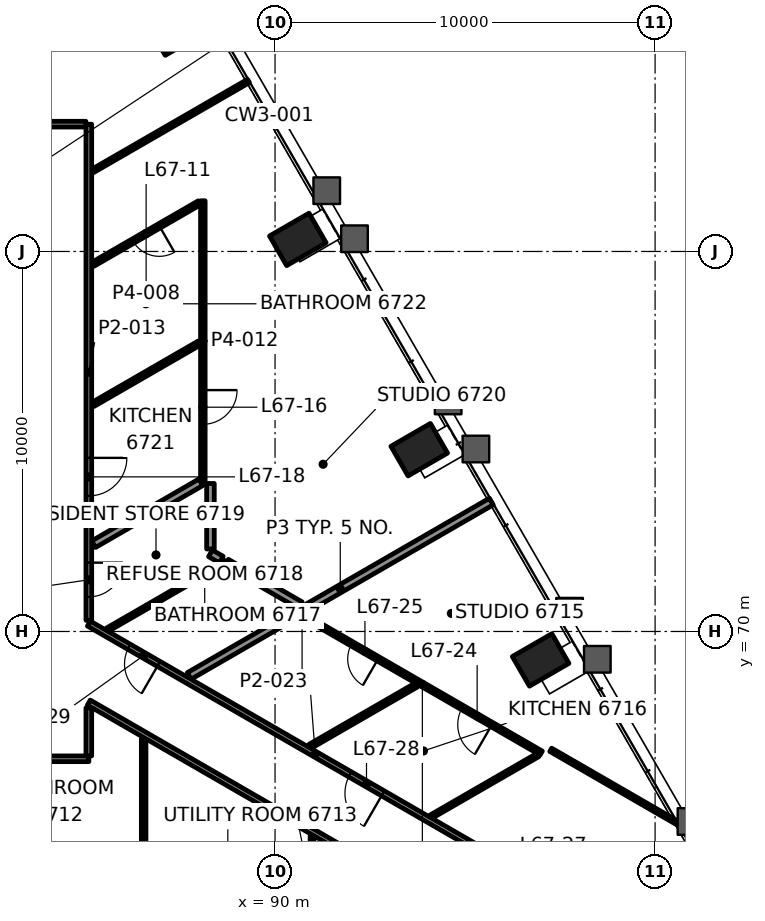
"""IFC4 building model, lengths in metres.
Left out: names, types, materials, properties, quantities, classifications, styles, units other than length and angle.
Written with IfcOpenShell. Run it as: python <this file> out.ifc"""

import sys

from ifc_helpers import new_model, si_unit, direction, frame, frame_2d, origin, origin_2d, place, context, subcontext, project, spatial, rectangle, hollow_rectangle, extrude, element, fill, save


model = new_model("IFC4")
c1 = context("Model", 3, precision=1e-05, world=origin(), true_north=direction((0.0, 1.0)))
c2 = subcontext(c1, "Body", "Model", "MODEL_VIEW")
j1 = project(units=[si_unit("LENGTHUNIT", "METRE"), si_unit("PLANEANGLEUNIT", "RADIAN")], contexts=[c1])
p1 = place(None, origin())
s1 = spatial("IfcSite", under=j1, at=p1, CompositionType="ELEMENT")
p2 = place(p1, origin())
s2 = spatial("IfcBuilding", under=s1, at=p2, CompositionType="ELEMENT")
p3 = place(p2, frame((0.0, 0.0, 281.1)))
s3 = spatial("IfcBuildingStorey", under=s2, at=p3, CompositionType="ELEMENT", Elevation=281.1)
for number, where, z_axis, x_axis in (
    (1, (96.989, 69.251, -0.0), (0.0, 0.0, 1.0), (-0.5, 0.866, 0.0)),
    (2, (93.794, 74.784, -0.0), (0.0, 0.0, 1.0), (-0.5, 0.866, 0.0)),
    (3, (90.599, 80.317, -0.0), (0.0, 0.0, 1.0), (-0.5, 0.866, 0.0)),
    (4, (87.405, 85.851, -0.0), (0.0, 0.0, 1.0), (-0.5, 0.866, 0.0)),
):
    element("IfcColumn", number, at=place(p3, frame(where, z_axis=z_axis, x_axis=x_axis)), inside=s3, PredefinedType="COLUMN", context=c2, shape_type="SweptSolid", body=[
        extrude(hollow_rectangle(XDim=0.9, YDim=1.2, WallThickness=0.06, at=origin_2d()), origin(), (0.0, 0.0, 1.0), 3.5),
    ])
p4 = place(p3, frame((85.1, 66.65, 0.0), z_axis=(0.0, 0.0, 1.0), x_axis=(-1.0, 0.0, 0.0)))
e5 = element("IfcWall", 5, at=p4, inside=s3, PredefinedType="PARTITIONING", context=c2, shape_type="SweptSolid", body=[
    extrude(rectangle(XDim=20.2, YDim=0.15, at=frame_2d((10.1, 0.0))), origin(), (0.0, 0.0, 1.0), 2.7),
])
p5 = place(p4, frame((6.405, 0.0, 0.0)))
e6 = element("IfcOpeningElement", 6, at=p5, cuts=e5, PredefinedType="OPENING", context=c2, shape_type="SweptSolid", body=[
    extrude(rectangle(XDim=1.0, YDim=2.1, at=frame_2d((0.5, 1.05))), frame((0.0, 0.085, 0.0), z_axis=(0.0, -1.0, 0.0), x_axis=(1.0, 0.0, 0.0)), (0.0, 0.0, 1.0), 0.17),
])
p6 = place(p4, frame((12.845, 0.0, 0.0)))
e7 = element("IfcOpeningElement", 7, at=p6, cuts=e5, PredefinedType="OPENING", context=c2, shape_type="SweptSolid", body=[
    extrude(rectangle(XDim=0.9, YDim=2.1, at=frame_2d((0.45, 1.05))), frame((0.0, 0.085, 0.0), z_axis=(0.0, -1.0, 0.0), x_axis=(1.0, 0.0, 0.0)), (0.0, 0.0, 1.0), 0.17),
])
p7 = place(p3, frame((78.2, 83.35, 0.0), z_axis=(0.0, 0.0, 1.0), x_axis=(1.0, 0.0, 0.0)))
e8 = element("IfcWall", 8, at=p7, inside=s3, PredefinedType="PARTITIONING", context=c2, shape_type="SweptSolid", body=[
    extrude(rectangle(XDim=6.823, YDim=0.15, at=frame_2d((3.412, 0.0))), origin(), (0.0, 0.0, 1.0), 2.7),
])
p8 = place(p7, frame((2.961, 0.0, 0.0)))
e9 = element("IfcOpeningElement", 9, at=p8, cuts=e8, PredefinedType="OPENING", context=c2, shape_type="SweptSolid", body=[
    extrude(rectangle(XDim=0.9, YDim=2.1, at=frame_2d((0.45, 1.05))), frame((0.0, 0.085, 0.0), z_axis=(0.0, -1.0, 0.0), x_axis=(1.0, 0.0, 0.0)), (0.0, 0.0, 1.0), 0.17),
])
p9 = place(p3, frame((94.104, 65.126, 0.0), z_axis=(0.0, 0.0, 1.0), x_axis=(0.866000336211, 0.500043415797, 0.0)))
e10 = element("IfcWall", 10, at=p9, inside=s3, PredefinedType="PARTITIONING", context=c2, shape_type="SweptSolid", body=[
    extrude(rectangle(XDim=3.248, YDim=0.1, at=frame_2d((1.624, 0.0))), origin(), (0.0, 0.0, 1.0), 2.7),
])
p10 = place(p3, frame((90.918, 66.975, 0.0), z_axis=(0.0, 0.0, 1.0), x_axis=(0.86605210011, 0.499953757757, 0.0)))
e11 = element("IfcWall", 11, at=p10, inside=s3, PredefinedType="PARTITIONING", context=c2, shape_type="SweptSolid", body=[
    extrude(rectangle(XDim=3.228, YDim=0.12, at=frame_2d((1.614, 0.0))), origin(), (0.0, 0.0, 1.0), 2.7),
])
p11 = place(p3, frame((87.741, 68.83, 0.0), z_axis=(0.0, 0.0, 1.0), x_axis=(0.866026579827, 0.499997963029, 0.0)))
e12 = element("IfcWall", 12, at=p11, inside=s3, PredefinedType="PARTITIONING", context=c2, shape_type="SweptSolid", body=[
    extrude(rectangle(XDim=9.179, YDim=0.2, at=frame_2d((4.59, 0.0))), origin(), (0.0, 0.0, 1.0), 2.688),
])
p12 = place(p3, frame((85.585, 70.045, 0.0), z_axis=(0.0, 0.0, 1.0), x_axis=(0.866004928679, 0.500035462246, 0.0)))
e13 = element("IfcWall", 13, at=p12, inside=s3, PredefinedType="PARTITIONING", context=c2, shape_type="SweptSolid", body=[
    extrude(rectangle(XDim=3.578, YDim=0.1, at=frame_2d((1.789, 0.0))), origin(), (0.0, 0.0, 1.0), 2.7),
])
p13 = place(p3, frame((85.227, 72.297, 0.0), z_axis=(0.0, 0.0, 1.0), x_axis=(0.866002113569, 0.500040337666, 0.0)))
e14 = element("IfcWall", 14, at=p13, inside=s3, PredefinedType="PARTITIONING", context=c2, shape_type="SweptSolid", body=[
    extrude(rectangle(XDim=3.258, YDim=0.2, at=frame_2d((1.629, 0.0))), origin(), (0.0, 0.0, 1.0), 2.7),
])
p14 = place(p3, frame((85.21, 75.976, 0.0), z_axis=(0.0, 0.0, 1.0), x_axis=(0.86605210011, 0.499953757757, 0.0)))
e15 = element("IfcWall", 15, at=p14, inside=s3, PredefinedType="PARTITIONING", context=c2, shape_type="SweptSolid", body=[
    extrude(rectangle(XDim=3.228, YDim=0.12, at=frame_2d((1.614, 0.0))), origin(), (0.0, 0.0, 1.0), 2.7),
])
p15 = place(p3, frame((88.005, 81.279, 0.0), z_axis=(0.0, 0.0, 1.0), x_axis=(-0.866000447062, -0.500043223821, 0.0)))
e16 = element("IfcWall", 16, at=p15, inside=s3, PredefinedType="PARTITIONING", context=c2, shape_type="SweptSolid", body=[
    extrude(rectangle(XDim=3.228, YDim=0.12, at=frame_2d((1.614, 0.0))), origin(), (0.0, 0.0, 1.0), 2.7),
])
p16 = place(p15, frame((1.214, 0.0, 0.0)))
e17 = element("IfcOpeningElement", 17, at=p16, cuts=e16, PredefinedType="OPENING", context=c2, shape_type="SweptSolid", body=[
    extrude(rectangle(XDim=0.8, YDim=2.1, at=frame_2d((0.4, 1.05))), frame((0.0, 0.07, 0.0), z_axis=(0.0, -1.0, 0.0), x_axis=(1.0, 0.0, 0.0)), (0.0, 0.0, 1.0), 0.14),
])
p17 = place(p3, frame((85.201, 82.119, 0.0), z_axis=(0.0, 0.0, 1.0), x_axis=(0.866035297817, 0.499982862641, 0.0)))
e18 = element("IfcWall", 18, at=p17, inside=s3, PredefinedType="PARTITIONING", context=c2, shape_type="SweptSolid", body=[
    extrude(rectangle(XDim=4.734, YDim=0.1, at=frame_2d((2.367, 0.0))), origin(), (0.0, 0.0, 1.0), 2.688),
])
p18 = place(p3, frame((90.973, 59.432, 0.0), z_axis=(0.0, 0.0, 1.0), x_axis=(0.0, 1.0, 0.0)))
e19 = element("IfcWall", 19, at=p18, inside=s3, PredefinedType="PARTITIONING", context=c2, shape_type="SweptSolid", body=[
    extrude(rectangle(XDim=5.19, YDim=0.1, at=frame_2d((2.595, 0.0))), origin(), (0.0, 0.0, 1.0), 2.7),
])
p19 = place(p3, frame((88.3, 72.171, 0.0), z_axis=(0.0, 0.0, 1.0), x_axis=(0.0, 1.0, 0.0)))
e20 = element("IfcWall", 20, at=p19, inside=s3, PredefinedType="PARTITIONING", context=c2, shape_type="SweptSolid", body=[
    extrude(rectangle(XDim=1.724, YDim=0.2, at=frame_2d((0.862, 0.0))), origin(), (0.0, 0.0, 1.0), 2.7),
])
p20 = place(p3, frame((88.1, 81.334, 0.0), z_axis=(0.0, 0.0, 1.0), x_axis=(0.0, -1.0, 0.0)))
e21 = element("IfcWall", 21, at=p20, inside=s3, PredefinedType="PARTITIONING", context=c2, shape_type="SweptSolid", body=[
    extrude(rectangle(XDim=7.378, YDim=0.12, at=frame_2d((3.689, 0.0))), origin(), (0.0, 0.0, 1.0), 2.7),
])
p21 = place(p20, frame((4.982, 0.0, 0.0)))
e22 = element("IfcOpeningElement", 22, at=p21, cuts=e21, PredefinedType="OPENING", context=c2, shape_type="SweptSolid", body=[
    extrude(rectangle(XDim=0.9, YDim=2.1, at=frame_2d((0.45, 1.05))), frame((0.0, 0.07, 0.0), z_axis=(0.0, -1.0, 0.0), x_axis=(1.0, 0.0, 0.0)), (0.0, 0.0, 1.0), 0.14),
])
p22 = place(p3, frame((86.542, 63.71, 0.0), z_axis=(0.0, 0.0, 1.0), x_axis=(0.0, 1.0, 0.0)))
e23 = element("IfcWall", 23, at=p22, inside=s3, PredefinedType="PARTITIONING", context=c2, shape_type="SweptSolid", body=[
    extrude(rectangle(XDim=3.46, YDim=0.12, at=frame_2d((1.73, 0.0))), origin(), (0.0, 0.0, 1.0), 2.547),
])
p23 = place(p3, frame((85.1, 66.725, 0.0), z_axis=(0.0, 0.0, 1.0), x_axis=(0.0, 1.0, 0.0)))
e24 = element("IfcWall", 24, at=p23, inside=s3, PredefinedType="PARTITIONING", context=c2, shape_type="SweptSolid", body=[
    extrude(rectangle(XDim=1.268, YDim=0.15, at=frame_2d((0.634, 0.0))), origin(), (0.0, 0.0, 1.0), 2.547),
])
p24 = place(p3, frame((85.1, 83.348, 0.0), z_axis=(0.0, 0.0, 1.0), x_axis=(0.0, -1.0, 0.0)))
e25 = element("IfcWall", 25, at=p24, inside=s3, PredefinedType="PARTITIONING", context=c2, shape_type="SweptSolid", body=[
    extrude(rectangle(XDim=13.053, YDim=0.15, at=frame_2d((6.527, 0.0))), origin(), (0.0, 0.0, 1.0), 2.7),
])
p25 = place(p24, frame((8.78, 0.0, 0.0)))
e26 = element("IfcOpeningElement", 26, at=p25, cuts=e25, PredefinedType="OPENING", context=c2, shape_type="SweptSolid", body=[
    extrude(rectangle(XDim=1.0, YDim=2.1, at=frame_2d((0.5, 1.05))), frame((0.0, 0.085, 0.0), z_axis=(0.0, -1.0, 0.0), x_axis=(1.0, 0.0, 0.0)), (0.0, 0.0, 1.0), 0.17),
])
p26 = place(p24, frame((11.537, 0.0, 0.0)))
e27 = element("IfcOpeningElement", 27, at=p26, cuts=e25, PredefinedType="OPENING", context=c2, shape_type="SweptSolid", body=[
    extrude(rectangle(XDim=0.9, YDim=2.1, at=frame_2d((0.45, 1.05))), frame((0.0, 0.085, 0.0), z_axis=(0.0, -1.0, 0.0), x_axis=(1.0, 0.0, 0.0)), (0.0, 0.0, 1.0), 0.17),
])
p27 = place(p3, frame((100.566, 64.974, 0.0), z_axis=(0.0, 0.0, 1.0), x_axis=(-0.8660389038, 0.499976616558, 0.0)))
e28 = element("IfcWall", 28, at=p27, inside=s3, PredefinedType="PARTITIONING", context=c2, shape_type="SweptSolid", body=[
    extrude(rectangle(XDim=3.825, YDim=0.1, at=frame_2d((1.913, 0.0))), origin(), (0.0, 0.0, 1.0), 2.7),
])
p28 = place(p3, frame((90.662, 70.692, 0.0), z_axis=(0.0, 0.0, 1.0), x_axis=(-0.866034963436, 0.499983441833, 0.0)))
e29 = element("IfcWall", 29, at=p28, inside=s3, PredefinedType="PARTITIONING", context=c2, shape_type="SweptSolid", body=[
    extrude(rectangle(XDim=2.24, YDim=0.2, at=frame_2d((1.12, 0.0))), origin(), (0.0, 0.0, 1.0), 2.7),
])
p29 = place(p3, frame((97.003, 66.8, 0.0), z_axis=(0.0, 0.0, 1.0), x_axis=(-0.866012764826, 0.500021890679, 0.0)))
e30 = element("IfcWall", 30, at=p29, inside=s3, PredefinedType="PARTITIONING", context=c2, shape_type="SweptSolid", body=[
    extrude(rectangle(XDim=7.222, YDim=0.12, at=frame_2d((3.611, 0.0))), origin(), (0.0, 0.0, 1.0), 2.7),
])
p30 = place(p29, frame((1.496, 0.0, 0.0)))
e31 = element("IfcOpeningElement", 31, at=p30, cuts=e30, PredefinedType="OPENING", context=c2, shape_type="SweptSolid", body=[
    extrude(rectangle(XDim=0.9, YDim=2.1, at=frame_2d((0.45, 1.05))), frame((0.0, 0.07, 0.0), z_axis=(0.0, -1.0, 0.0), x_axis=(1.0, 0.0, 0.0)), (0.0, 0.0, 1.0), 0.14),
])
p31 = place(p29, frame((4.956, 0.0, 0.0)))
e32 = element("IfcOpeningElement", 32, at=p31, cuts=e30, PredefinedType="OPENING", context=c2, shape_type="SweptSolid", body=[
    extrude(rectangle(XDim=0.8, YDim=2.1, at=frame_2d((0.4, 1.05))), frame((0.0, 0.07, 0.0), z_axis=(0.0, -1.0, 0.0), x_axis=(1.0, 0.0, 0.0)), (0.0, 0.0, 1.0), 0.14),
])
p32 = place(p3, frame((97.014, 63.329, 0.0), z_axis=(0.0, 0.0, 1.0), x_axis=(-0.866023045711, 0.500004084281, 0.0)))
e33 = element("IfcWall", 33, at=p32, inside=s3, PredefinedType="PARTITIONING", context=c2, shape_type="SweptSolid", body=[
    extrude(rectangle(XDim=13.757, YDim=0.15, at=frame_2d((6.879, 0.0))), origin(), (0.0, 0.0, 1.0), 2.7),
])
p33 = place(p32, frame((1.39, 0.0, 0.0)))
e34 = element("IfcOpeningElement", 34, at=p33, cuts=e33, PredefinedType="OPENING", context=c2, shape_type="SweptSolid", body=[
    extrude(rectangle(XDim=0.9, YDim=2.1, at=frame_2d((0.45, 1.05))), frame((0.0, 0.085, 0.0), z_axis=(0.0, -1.0, 0.0), x_axis=(1.0, 0.0, 0.0)), (0.0, 0.0, 1.0), 0.17),
])
p34 = place(p32, frame((4.821, 0.0, 0.0)))
e35 = element("IfcOpeningElement", 35, at=p34, cuts=e33, PredefinedType="OPENING", context=c2, shape_type="SweptSolid", body=[
    extrude(rectangle(XDim=1.0, YDim=2.1, at=frame_2d((0.5, 1.05))), frame((0.0, 0.085, 0.0), z_axis=(0.0, -1.0, 0.0), x_axis=(1.0, 0.0, 0.0)), (0.0, 0.0, 1.0), 0.17),
])
p35 = place(p32, frame((11.634, 0.0, 0.0)))
e36 = element("IfcOpeningElement", 36, at=p35, cuts=e33, PredefinedType="OPENING", context=c2, shape_type="SweptSolid", body=[
    extrude(rectangle(XDim=0.9, YDim=2.1, at=frame_2d((0.45, 1.05))), frame((0.0, 0.085, 0.0), z_axis=(0.0, -1.0, 0.0), x_axis=(1.0, 0.0, 0.0)), (0.0, 0.0, 1.0), 0.17),
])
p36 = place(p3, frame((96.114, 61.771, 0.0), z_axis=(0.0, 0.0, 1.0), x_axis=(-0.866021912989, 0.500006046186, 0.0)))
e37 = element("IfcWall", 37, at=p36, inside=s3, PredefinedType="PARTITIONING", context=c2, shape_type="SweptSolid", body=[
    extrude(rectangle(XDim=12.718, YDim=0.15, at=frame_2d((6.359, 0.0))), origin(), (0.0, 0.0, 1.0), 2.547),
])
p37 = place(p3, frame((88.584, 71.892, 0.0), z_axis=(0.0, 0.0, 1.0), x_axis=(-0.865987003449, 0.500066505434, 0.0)))
e38 = element("IfcWall", 38, at=p37, inside=s3, PredefinedType="PARTITIONING", context=c2, shape_type="SweptSolid", body=[
    extrude(rectangle(XDim=0.328, YDim=0.2, at=frame_2d((0.164, 0.0))), origin(), (0.0, 0.0, 1.0), 2.7),
])
p38 = place(p16, origin())
e39 = element("IfcDoor", 39, at=p38, inside=s3, OperationType="SINGLE_SWING_RIGHT", PredefinedType="DOOR", context=c2, shape_type="SweptSolid", body=[
    extrude(rectangle(XDim=0.8, YDim=2.1, at=frame_2d((0.4, 1.05))), frame((0.0, 0.025, 0.0), z_axis=(0.0, -1.0, 0.0), x_axis=(1.0, 0.0, 0.0)), (0.0, 0.0, 1.0), 0.05),
])
fill(e17, e39)
p39 = place(p21, origin())
e40 = element("IfcDoor", 40, at=p39, inside=s3, OperationType="SINGLE_SWING_RIGHT", PredefinedType="DOOR", context=c2, shape_type="SweptSolid", body=[
    extrude(rectangle(XDim=0.9, YDim=2.1, at=frame_2d((0.45, 1.05))), frame((0.0, 0.025, 0.0), z_axis=(0.0, -1.0, 0.0), x_axis=(1.0, 0.0, 0.0)), (0.0, 0.0, 1.0), 0.05),
])
fill(e22, e40)
p40 = place(p25, origin())
e41 = element("IfcDoor", 41, at=p40, inside=s3, OperationType="SINGLE_SWING_LEFT", PredefinedType="DOOR", context=c2, shape_type="SweptSolid", body=[
    extrude(rectangle(XDim=1.0, YDim=2.1, at=frame_2d((0.5, 1.05))), frame((0.0, 0.025, 0.0), z_axis=(0.0, -1.0, 0.0), x_axis=(1.0, 0.0, 0.0)), (0.0, 0.0, 1.0), 0.05),
])
fill(e26, e41)
p41 = place(p26, origin())
e42 = element("IfcDoor", 42, at=p41, inside=s3, OperationType="SINGLE_SWING_LEFT", PredefinedType="DOOR", context=c2, shape_type="SweptSolid", body=[
    extrude(rectangle(XDim=0.9, YDim=2.1, at=frame_2d((0.45, 1.05))), frame((0.0, 0.025, 0.0), z_axis=(0.0, -1.0, 0.0), x_axis=(1.0, 0.0, 0.0)), (0.0, 0.0, 1.0), 0.05),
])
fill(e27, e42)
p42 = place(p30, origin())
e43 = element("IfcDoor", 43, at=p42, inside=s3, OperationType="SINGLE_SWING_RIGHT", PredefinedType="DOOR", context=c2, shape_type="SweptSolid", body=[
    extrude(rectangle(XDim=0.9, YDim=2.1, at=frame_2d((0.45, 1.05))), frame((0.0, 0.025, 0.0), z_axis=(0.0, -1.0, 0.0), x_axis=(1.0, 0.0, 0.0)), (0.0, 0.0, 1.0), 0.05),
])
fill(e31, e43)
p43 = place(p31, origin())
e44 = element("IfcDoor", 44, at=p43, inside=s3, OperationType="SINGLE_SWING_RIGHT", PredefinedType="DOOR", context=c2, shape_type="SweptSolid", body=[
    extrude(rectangle(XDim=0.8, YDim=2.1, at=frame_2d((0.4, 1.05))), frame((0.0, 0.025, 0.0), z_axis=(0.0, -1.0, 0.0), x_axis=(1.0, 0.0, 0.0)), (0.0, 0.0, 1.0), 0.05),
])
fill(e32, e44)
p44 = place(p33, origin())
e45 = element("IfcDoor", 45, at=p44, inside=s3, OperationType="SINGLE_SWING_LEFT", PredefinedType="DOOR", context=c2, shape_type="SweptSolid", body=[
    extrude(rectangle(XDim=0.9, YDim=2.1, at=frame_2d((0.45, 1.05))), frame((0.0, 0.025, 0.0), z_axis=(0.0, -1.0, 0.0), x_axis=(1.0, 0.0, 0.0)), (0.0, 0.0, 1.0), 0.05),
])
fill(e34, e45)
p45 = place(p34, origin())
e46 = element("IfcDoor", 46, at=p45, inside=s3, OperationType="SINGLE_SWING_LEFT", PredefinedType="DOOR", context=c2, shape_type="SweptSolid", body=[
    extrude(rectangle(XDim=1.0, YDim=2.1, at=frame_2d((0.5, 1.05))), frame((0.0, 0.025, 0.0), z_axis=(0.0, -1.0, 0.0), x_axis=(1.0, 0.0, 0.0)), (0.0, 0.0, 1.0), 0.05),
])
fill(e35, e46)
p46 = place(p35, origin())
e47 = element("IfcDoor", 47, at=p46, inside=s3, OperationType="SINGLE_SWING_LEFT", PredefinedType="DOOR", context=c2, shape_type="SweptSolid", body=[
    extrude(rectangle(XDim=0.9, YDim=2.1, at=frame_2d((0.45, 1.05))), frame((0.0, 0.025, 0.0), z_axis=(0.0, -1.0, 0.0), x_axis=(1.0, 0.0, 0.0)), (0.0, 0.0, 1.0), 0.05),
])
fill(e36, e47)
save(model, sys.argv[1])
